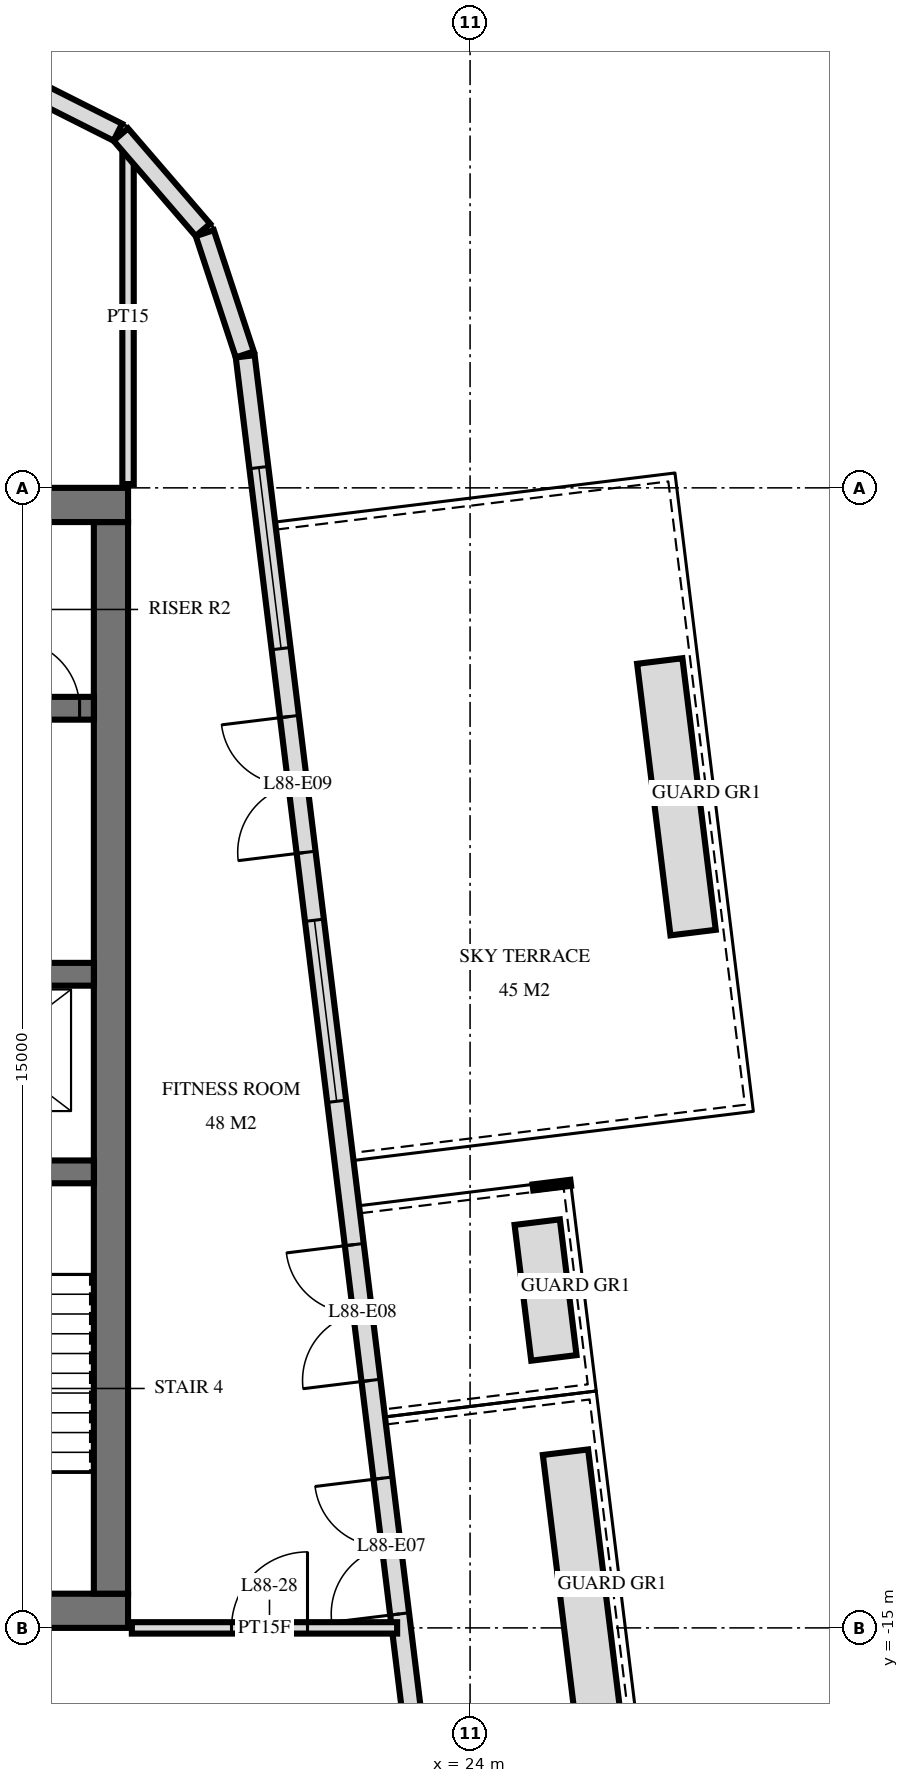
"""IFC4 building model, lengths in metres.
Left out: names, types, materials, properties, quantities, classifications, styles, units other than length and angle.
Written with IfcOpenShell. Run it as: python <this file> out.ifc"""

import sys

from ifc_helpers import new_model, si_unit, direction, frame, frame_2d, origin, place, context, subcontext, project, spatial, rectangle, extrude, element, fill, save


model = new_model("IFC4")
c1 = context("Model", 3, precision=1e-05, world=origin(), true_north=direction((0.0, 1.0)))
c2 = subcontext(c1, "Body", "Model", "MODEL_VIEW")
j1 = project(units=[si_unit("LENGTHUNIT", "METRE"), si_unit("PLANEANGLEUNIT", "RADIAN")], contexts=[c1])
p1 = place(None, origin())
s1 = spatial("IfcSite", under=j1, at=p1, CompositionType="ELEMENT")
p2 = place(p1, origin())
s2 = spatial("IfcBuilding", under=s1, at=p2, CompositionType="ELEMENT")
p3 = place(p2, frame((0.0, 0.0, 334.6)))
s3 = spatial("IfcBuildingStorey", under=s2, at=p3, CompositionType="ELEMENT", Elevation=334.6)
p4 = place(p3, frame((10.0, -0.225, 0.0), z_axis=(0.0, 0.0, 1.0), x_axis=(1.0, 0.0, 0.0)))
e1 = element("IfcWall", 1, at=p4, inside=s3, PredefinedType="SHEAR", context=c2, shape_type="SweptSolid", body=[
    extrude(rectangle(XDim=9.5, YDim=0.45, at=frame_2d((4.75, 0.0))), origin(), (0.0, 0.0, 1.0), 4.0),
])
p5 = place(p3, frame((10.0, -14.775, 0.0), z_axis=(0.0, 0.0, 1.0), x_axis=(1.0, 0.0, 0.0)))
e2 = element("IfcWall", 2, at=p5, inside=s3, PredefinedType="SHEAR", context=c2, shape_type="SweptSolid", body=[
    extrude(rectangle(XDim=9.5, YDim=0.45, at=frame_2d((4.75, 0.0))), origin(), (0.0, 0.0, 1.0), 4.0),
])
p6 = place(p5, frame((7.1, 0.0, 0.0)))
e3 = element("IfcOpeningElement", 3, at=p6, cuts=e2, PredefinedType="OPENING", context=c2, shape_type="SweptSolid", body=[
    extrude(rectangle(XDim=1.2, YDim=2.1, at=frame_2d((0.6, 1.05))), frame((0.0, 0.235, 0.0), z_axis=(0.0, -1.0, 0.0), x_axis=(1.0, 0.0, 0.0)), (0.0, 0.0, 1.0), 0.47),
])
p7 = place(p5, frame((4.15, 0.0, 0.0)))
e4 = element("IfcOpeningElement", 4, at=p7, cuts=e2, PredefinedType="OPENING", context=c2, shape_type="SweptSolid", body=[
    extrude(rectangle(XDim=1.1, YDim=2.1, at=frame_2d((0.55, 1.05))), frame((0.0, 0.235, 0.0), z_axis=(0.0, -1.0, 0.0), x_axis=(1.0, 0.0, 0.0)), (0.0, 0.0, 1.0), 0.47),
])
p8 = place(p3, frame((19.275, -14.55, 0.0), z_axis=(0.0, 0.0, 1.0), x_axis=(0.0, 1.0, 0.0)))
e5 = element("IfcWall", 5, at=p8, inside=s3, PredefinedType="SHEAR", context=c2, shape_type="SweptSolid", body=[
    extrude(rectangle(XDim=14.1, YDim=0.45, at=frame_2d((7.05, 0.0))), origin(), (0.0, 0.0, 1.0), 4.0),
])
p9 = place(p3, frame((10.35, -2.9, 0.0), z_axis=(0.0, 0.0, 1.0), x_axis=(1.0, 0.0, 0.0)))
e6 = element("IfcWall", 6, at=p9, inside=s3, PredefinedType="SHEAR", context=c2, shape_type="SweptSolid", body=[
    extrude(rectangle(XDim=8.7, YDim=0.3, at=frame_2d((4.35, 0.0))), origin(), (0.0, 0.0, 1.0), 4.0),
])
p10 = place(p9, frame((0.8, 0.0, 0.0)))
e7 = element("IfcOpeningElement", 7, at=p10, cuts=e6, PredefinedType="OPENING", context=c2, shape_type="SweptSolid", body=[
    extrude(rectangle(XDim=1.1, YDim=2.1, at=frame_2d((0.55, 1.05))), frame((0.0, 0.16, 0.0), z_axis=(0.0, -1.0, 0.0), x_axis=(1.0, 0.0, 0.0)), (0.0, 0.0, 1.0), 0.32),
])
p11 = place(p9, frame((3.8, 0.0, 0.0)))
e8 = element("IfcOpeningElement", 8, at=p11, cuts=e6, PredefinedType="OPENING", context=c2, shape_type="SweptSolid", body=[
    extrude(rectangle(XDim=1.1, YDim=2.1, at=frame_2d((0.55, 1.05))), frame((0.0, 0.16, 0.0), z_axis=(0.0, -1.0, 0.0), x_axis=(1.0, 0.0, 0.0)), (0.0, 0.0, 1.0), 0.32),
])
p12 = place(p9, frame((6.188, 0.0, 0.0)))
e9 = element("IfcOpeningElement", 9, at=p12, cuts=e6, PredefinedType="OPENING", context=c2, shape_type="SweptSolid", body=[
    extrude(rectangle(XDim=0.9, YDim=2.1, at=frame_2d((0.45, 1.05))), frame((0.0, 0.16, 0.0), z_axis=(0.0, -1.0, 0.0), x_axis=(1.0, 0.0, 0.0)), (0.0, 0.0, 1.0), 0.32),
])
p13 = place(p9, frame((7.613, 0.0, 0.0)))
e10 = element("IfcOpeningElement", 10, at=p13, cuts=e6, PredefinedType="OPENING", context=c2, shape_type="SweptSolid", body=[
    extrude(rectangle(XDim=0.9, YDim=2.1, at=frame_2d((0.45, 1.05))), frame((0.0, 0.16, 0.0), z_axis=(0.0, -1.0, 0.0), x_axis=(1.0, 0.0, 0.0)), (0.0, 0.0, 1.0), 0.32),
])
p14 = place(p3, frame((10.35, -6.4, 0.0), z_axis=(0.0, 0.0, 1.0), x_axis=(1.0, 0.0, 0.0)))
e11 = element("IfcWall", 11, at=p14, inside=s3, PredefinedType="SHEAR", context=c2, shape_type="SweptSolid", body=[
    extrude(rectangle(XDim=8.7, YDim=0.3, at=frame_2d((4.35, 0.0))), origin(), (0.0, 0.0, 1.0), 4.0),
])
p15 = place(p14, frame((6.8, 0.0, 0.0)))
e12 = element("IfcOpeningElement", 12, at=p15, cuts=e11, PredefinedType="OPENING", context=c2, shape_type="SweptSolid", body=[
    extrude(rectangle(XDim=1.1, YDim=2.1, at=frame_2d((0.55, 1.05))), frame((0.0, 0.16, 0.0), z_axis=(0.0, -1.0, 0.0), x_axis=(1.0, 0.0, 0.0)), (0.0, 0.0, 1.0), 0.32),
])
p16 = place(p3, frame((10.35, -9.0, 0.0), z_axis=(0.0, 0.0, 1.0), x_axis=(1.0, 0.0, 0.0)))
e13 = element("IfcWall", 13, at=p16, inside=s3, PredefinedType="SHEAR", context=c2, shape_type="SweptSolid", body=[
    extrude(rectangle(XDim=8.7, YDim=0.3, at=frame_2d((4.35, 0.0))), origin(), (0.0, 0.0, 1.0), 4.0),
])
p17 = place(p16, frame((3.8, 0.0, 0.0)))
e14 = element("IfcOpeningElement", 14, at=p17, cuts=e13, PredefinedType="OPENING", context=c2, shape_type="SweptSolid", body=[
    extrude(rectangle(XDim=1.1, YDim=2.1, at=frame_2d((0.55, 1.05))), frame((0.0, 0.16, 0.0), z_axis=(0.0, -1.0, 0.0), x_axis=(1.0, 0.0, 0.0)), (0.0, 0.0, 1.0), 0.32),
])
p18 = place(p3, frame((21.036, 1.755, 0.0), z_axis=(0.0, 0.0, 1.0), x_axis=(-0.313046160822, 0.949737911844, 0.0)))
e15 = element("IfcWall", 15, at=p18, inside=s3, PredefinedType="SOLIDWALL", context=c2, shape_type="SweptSolid", body=[
    extrude(rectangle(XDim=1.681, YDim=0.25, at=frame_2d((0.841, 0.0))), origin(), (0.0, 0.0, 1.0), 3.72),
])
for number, where, z_axis, x_axis in (
    (16, (20.485, 3.394, 0.0), (0.0, 0.0, 1.0), (-0.653, 0.758, 0.0)),
    (17, (19.366, 4.679, 0.0), (0.0, 0.0, 1.0), (-0.893, 0.45, 0.0)),
):
    element("IfcWall", number, at=place(p3, frame(where, z_axis=z_axis, x_axis=x_axis)), inside=s3, PredefinedType="SOLIDWALL", context=c2, shape_type="SweptSolid", body=[
        extrude(rectangle(XDim=1.656, YDim=0.25, at=frame_2d((0.828, 0.0))), origin(), (0.0, 0.0, 1.0), 3.72),
    ])
p19 = place(p3, frame((23.375, -17.277, 0.0), z_axis=(0.0, 0.0, 1.0), x_axis=(-0.121862878281, 0.992546945437, 0.0)))
e18 = element("IfcWall", 18, at=p19, inside=s3, PredefinedType="SOLIDWALL", context=c2, shape_type="SweptSolid", body=[
    extrude(rectangle(XDim=19.151, YDim=0.25, at=frame_2d((9.575, 0.0))), origin(), (0.0, 0.0, 1.0), 3.72),
])
p20 = place(p19, frame((2.479, 0.0, 0.0)))
e19 = element("IfcOpeningElement", 19, at=p20, cuts=e18, PredefinedType="OPENING", context=c2, shape_type="SweptSolid", body=[
    extrude(rectangle(XDim=1.8, YDim=2.4, at=frame_2d((0.9, 1.2))), frame((0.0, 0.135, 0.0), z_axis=(0.0, -1.0, 0.0), x_axis=(1.0, 0.0, 0.0)), (0.0, 0.0, 1.0), 0.27),
])
p21 = place(p19, frame((5.575, 0.0, 0.0)))
e20 = element("IfcOpeningElement", 20, at=p21, cuts=e18, PredefinedType="OPENING", context=c2, shape_type="SweptSolid", body=[
    extrude(rectangle(XDim=1.8, YDim=2.4, at=frame_2d((0.9, 1.2))), frame((0.0, 0.135, 0.0), z_axis=(0.0, -1.0, 0.0), x_axis=(1.0, 0.0, 0.0)), (0.0, 0.0, 1.0), 0.27),
])
p22 = place(p19, frame((9.275, 0.0, 0.0)))
e21 = element("IfcOpeningElement", 21, at=p22, cuts=e18, PredefinedType="OPENING", context=c2, shape_type="SweptSolid", body=[
    extrude(rectangle(XDim=2.4, YDim=2.4, at=frame_2d((1.2, 1.2))), frame((0.0, 0.135, 0.0), z_axis=(0.0, -1.0, 0.0), x_axis=(1.0, 0.0, 0.0)), (0.0, 0.0, 1.0), 0.27),
])
p23 = place(p19, frame((12.575, 0.0, 0.0)))
e22 = element("IfcOpeningElement", 22, at=p23, cuts=e18, PredefinedType="OPENING", context=c2, shape_type="SweptSolid", body=[
    extrude(rectangle(XDim=1.8, YDim=2.4, at=frame_2d((0.9, 1.2))), frame((0.0, 0.135, 0.0), z_axis=(0.0, -1.0, 0.0), x_axis=(1.0, 0.0, 0.0)), (0.0, 0.0, 1.0), 0.27),
])
p24 = place(p19, frame((15.276, 0.0, 0.0)))
e23 = element("IfcOpeningElement", 23, at=p24, cuts=e18, PredefinedType="OPENING", context=c2, shape_type="SweptSolid", body=[
    extrude(rectangle(XDim=2.4, YDim=2.4, at=frame_2d((1.2, 1.2))), frame((0.0, 0.135, 0.0), z_axis=(0.0, -1.0, 0.0), x_axis=(1.0, 0.0, 0.0)), (0.0, 0.0, 1.0), 0.27),
])
p25 = place(p3, frame((25.255, -12.688, 0.0), z_axis=(0.0, 0.0, 1.0), x_axis=(0.121864343918, -0.992546765488, 0.0)))
e24 = element("IfcWall", 24, at=p25, inside=s3, PredefinedType="USERDEFINED", context=c2, shape_type="SweptSolid", body=[
    extrude(rectangle(XDim=3.6, YDim=0.6, at=frame_2d((1.8, 0.0))), origin(), (0.0, 0.0, 1.0), 0.65),
])
p26 = place(p3, frame((24.883, -9.662, 0.0), z_axis=(0.0, 0.0, 1.0), x_axis=(0.121830336845, -0.992550940267, 0.0)))
e25 = element("IfcWall", 25, at=p26, inside=s3, PredefinedType="USERDEFINED", context=c2, shape_type="SweptSolid", body=[
    extrude(rectangle(XDim=1.8, YDim=0.6, at=frame_2d((0.9, 0.0))), origin(), (0.0, 0.0, 1.0), 0.65),
])
p27 = place(p3, frame((26.496, -2.278, 0.0), z_axis=(0.0, 0.0, 1.0), x_axis=(0.121864343918, -0.992546765488, 0.0)))
e26 = element("IfcWall", 26, at=p27, inside=s3, PredefinedType="USERDEFINED", context=c2, shape_type="SweptSolid", body=[
    extrude(rectangle(XDim=3.6, YDim=0.6, at=frame_2d((1.8, 0.0))), origin(), (0.0, 0.0, 1.0), 0.65),
])
p28 = place(p3, frame((19.5, 0.05, 0.0), z_axis=(0.0, 0.0, 1.0), x_axis=(0.0, 1.0, 0.0)))
e27 = element("IfcWall", 27, at=p28, inside=s3, PredefinedType="PARTITIONING", context=c2, shape_type="SweptSolid", body=[
    extrude(rectangle(XDim=4.403, YDim=0.15, at=frame_2d((2.202, 0.0))), origin(), (0.0, 0.0, 1.0), 3.72),
])
p29 = place(p3, frame((19.55, -15.0, 0.0), z_axis=(0.0, 0.0, 1.0), x_axis=(1.0, 0.0, 0.0)))
e28 = element("IfcWall", 28, at=p29, inside=s3, PredefinedType="PARTITIONING", context=c2, shape_type="SweptSolid", body=[
    extrude(rectangle(XDim=3.49, YDim=0.15, at=frame_2d((1.745, 0.0))), origin(), (0.0, 0.0, 1.0), 3.72),
])
p30 = place(p29, frame((1.311, 0.0, 0.0)))
e29 = element("IfcOpeningElement", 29, at=p30, cuts=e28, PredefinedType="OPENING", context=c2, shape_type="SweptSolid", body=[
    extrude(rectangle(XDim=1.0, YDim=2.1, at=frame_2d((0.5, 1.05))), frame((0.0, 0.085, 0.0), z_axis=(0.0, -1.0, 0.0), x_axis=(1.0, 0.0, 0.0)), (0.0, 0.0, 1.0), 0.17),
])
p31 = place(p20, origin())
e30 = element("IfcDoor", 30, at=p31, inside=s3, OperationType="DOUBLE_DOOR_SINGLE_SWING", PredefinedType="DOOR", context=c2, shape_type="SweptSolid", body=[
    extrude(rectangle(XDim=1.8, YDim=2.4, at=frame_2d((0.9, 1.2))), frame((0.0, 0.025, 0.0), z_axis=(0.0, -1.0, 0.0), x_axis=(1.0, 0.0, 0.0)), (0.0, 0.0, 1.0), 0.05),
])
fill(e19, e30)
p32 = place(p21, origin())
e31 = element("IfcDoor", 31, at=p32, inside=s3, OperationType="DOUBLE_DOOR_SINGLE_SWING", PredefinedType="DOOR", context=c2, shape_type="SweptSolid", body=[
    extrude(rectangle(XDim=1.8, YDim=2.4, at=frame_2d((0.9, 1.2))), frame((0.0, 0.025, 0.0), z_axis=(0.0, -1.0, 0.0), x_axis=(1.0, 0.0, 0.0)), (0.0, 0.0, 1.0), 0.05),
])
fill(e20, e31)
p33 = place(p22, origin())
e32 = element("IfcWindow", 32, at=p33, inside=s3, PartitioningType="SINGLE_PANEL", PredefinedType="WINDOW", context=c2, shape_type="SweptSolid", body=[
    extrude(rectangle(XDim=2.4, YDim=2.4, at=frame_2d((1.2, 1.2))), frame((0.0, 0.03, 0.0), z_axis=(0.0, -1.0, 0.0), x_axis=(1.0, 0.0, 0.0)), (0.0, 0.0, 1.0), 0.06),
])
fill(e21, e32)
p34 = place(p23, origin())
e33 = element("IfcDoor", 33, at=p34, inside=s3, OperationType="DOUBLE_DOOR_SINGLE_SWING", PredefinedType="DOOR", context=c2, shape_type="SweptSolid", body=[
    extrude(rectangle(XDim=1.8, YDim=2.4, at=frame_2d((0.9, 1.2))), frame((0.0, 0.025, 0.0), z_axis=(0.0, -1.0, 0.0), x_axis=(1.0, 0.0, 0.0)), (0.0, 0.0, 1.0), 0.05),
])
fill(e22, e33)
p35 = place(p24, origin())
e34 = element("IfcWindow", 34, at=p35, inside=s3, PartitioningType="SINGLE_PANEL", PredefinedType="WINDOW", context=c2, shape_type="SweptSolid", body=[
    extrude(rectangle(XDim=2.4, YDim=2.4, at=frame_2d((1.2, 1.2))), frame((0.0, 0.03, 0.0), z_axis=(0.0, -1.0, 0.0), x_axis=(1.0, 0.0, 0.0)), (0.0, 0.0, 1.0), 0.06),
])
fill(e23, e34)
p36 = place(p13, origin())
e35 = element("IfcDoor", 35, at=p36, inside=s3, OperationType="SINGLE_SWING_RIGHT", PredefinedType="DOOR", context=c2, shape_type="SweptSolid", body=[
    extrude(rectangle(XDim=0.9, YDim=2.1, at=frame_2d((0.45, 1.05))), frame((0.0, 0.025, 0.0), z_axis=(0.0, -1.0, 0.0), x_axis=(1.0, 0.0, 0.0)), (0.0, 0.0, 1.0), 0.05),
])
fill(e10, e35)
p37 = place(p30, origin())
e36 = element("IfcDoor", 36, at=p37, inside=s3, OperationType="SINGLE_SWING_LEFT", PredefinedType="DOOR", context=c2, shape_type="SweptSolid", body=[
    extrude(rectangle(XDim=1.0, YDim=2.1, at=frame_2d((0.5, 1.05))), frame((0.0, 0.025, 0.0), z_axis=(0.0, -1.0, 0.0), x_axis=(1.0, 0.0, 0.0)), (0.0, 0.0, 1.0), 0.05),
])
fill(e29, e36)
save(model, sys.argv[1])
